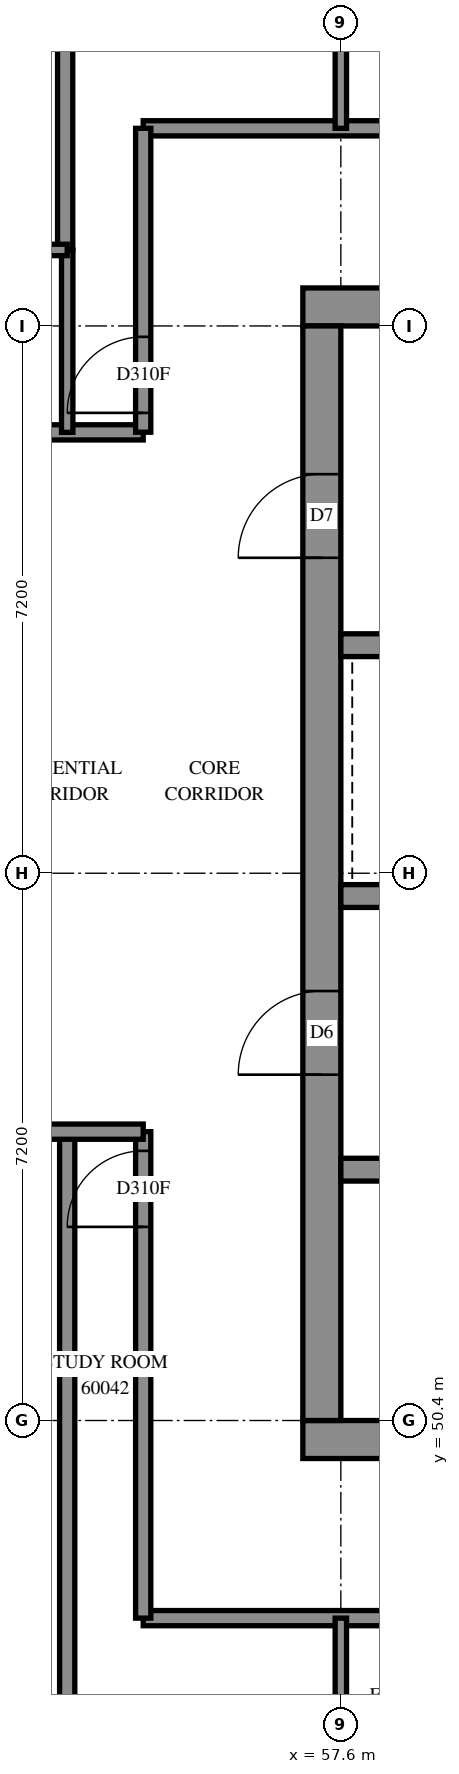
"""IFC4 building model, lengths in metres.
Left out: names, types, materials, properties, quantities, classifications, styles, units other than length and angle.
Written with IfcOpenShell. Run it as: python <this file> out.ifc"""

import sys

from ifc_helpers import new_model, si_unit, direction, frame, frame_2d, origin, place, context, subcontext, project, spatial, rectangle, extrude, element, fill, save


model = new_model("IFC4")
c1 = context("Model", 3, precision=1e-05, world=origin(), true_north=direction((0.0, 1.0)))
c2 = subcontext(c1, "Body", "Model", "MODEL_VIEW")
j1 = project(units=[si_unit("LENGTHUNIT", "METRE"), si_unit("PLANEANGLEUNIT", "RADIAN")], contexts=[c1])
p1 = place(None, origin())
s1 = spatial("IfcSite", under=j1, at=p1, CompositionType="ELEMENT")
p2 = place(p1, origin())
s2 = spatial("IfcBuilding", under=s1, at=p2, CompositionType="ELEMENT")
p3 = place(p2, frame((0.0, 0.0, 220.2)))
s3 = spatial("IfcBuildingStorey", under=s2, at=p3, CompositionType="ELEMENT", Elevation=220.2)
p4 = place(p3, frame((57.1, 50.15, -0.3), z_axis=(0.0, 0.0, 1.0), x_axis=(1.0, 0.0, 0.0)))
e1 = element("IfcWall", 1, at=p4, inside=s3, PredefinedType="SHEAR", context=c2, shape_type="SweptSolid", body=[
    extrude(rectangle(XDim=15.4, YDim=0.5, at=frame_2d((7.7, 0.0))), origin(), (0.0, 0.0, 1.0), 2.7),
])
p5 = place(p3, frame((57.1, 65.05, -0.3), z_axis=(0.0, 0.0, 1.0), x_axis=(1.0, 0.0, 0.0)))
e2 = element("IfcWall", 2, at=p5, inside=s3, PredefinedType="SHEAR", context=c2, shape_type="SweptSolid", body=[
    extrude(rectangle(XDim=15.4, YDim=0.5, at=frame_2d((7.7, 0.0))), origin(), (0.0, 0.0, 1.0), 2.7),
])
p6 = place(p5, frame((10.5, 0.0, 0.3)))
e3 = element("IfcOpeningElement", 3, at=p6, cuts=e2, PredefinedType="OPENING", context=c2, shape_type="SweptSolid", body=[
    extrude(rectangle(XDim=0.8, YDim=2.1, at=frame_2d((0.4, 1.05))), frame((0.0, 0.26, 0.0), z_axis=(0.0, -1.0, 0.0), x_axis=(1.0, 0.0, 0.0)), (0.0, 0.0, 1.0), 0.52),
])
p7 = place(p3, frame((57.35, 50.4, -0.3), z_axis=(0.0, 0.0, 1.0), x_axis=(0.0, 1.0, 0.0)))
e4 = element("IfcWall", 4, at=p7, inside=s3, PredefinedType="SHEAR", context=c2, shape_type="SweptSolid", body=[
    extrude(rectangle(XDim=14.4, YDim=0.5, at=frame_2d((7.2, 0.0))), origin(), (0.0, 0.0, 1.0), 2.7),
])
p8 = place(p7, frame((4.55, 0.0, 0.3)))
e5 = element("IfcOpeningElement", 5, at=p8, cuts=e4, PredefinedType="OPENING", context=c2, shape_type="SweptSolid", body=[
    extrude(rectangle(XDim=1.1, YDim=2.1, at=frame_2d((0.55, 1.05))), frame((0.0, 0.26, 0.0), z_axis=(0.0, -1.0, 0.0), x_axis=(1.0, 0.0, 0.0)), (0.0, 0.0, 1.0), 0.52),
])
p9 = place(p7, frame((11.35, 0.0, 0.3)))
e6 = element("IfcOpeningElement", 6, at=p9, cuts=e4, PredefinedType="OPENING", context=c2, shape_type="SweptSolid", body=[
    extrude(rectangle(XDim=1.1, YDim=2.1, at=frame_2d((0.55, 1.05))), frame((0.0, 0.26, 0.0), z_axis=(0.0, -1.0, 0.0), x_axis=(1.0, 0.0, 0.0)), (0.0, 0.0, 1.0), 0.52),
])
p10 = place(p3, frame((57.6, 53.7, 0.0), z_axis=(0.0, 0.0, 1.0), x_axis=(1.0, 0.0, 0.0)))
e7 = element("IfcWall", 7, at=p10, inside=s3, PredefinedType="SOLIDWALL", context=c2, shape_type="SweptSolid", body=[
    extrude(rectangle(XDim=14.4, YDim=0.3, at=frame_2d((7.2, 0.0))), origin(), (0.0, 0.0, 1.0), 3.1),
])
p11 = place(p10, frame((1.35, 0.0, 0.0)))
e8 = element("IfcOpeningElement", 8, at=p11, cuts=e7, PredefinedType="OPENING", context=c2, shape_type="SweptSolid", body=[
    extrude(rectangle(XDim=0.9, YDim=2.1, at=frame_2d((0.45, 1.05))), frame((0.0, 0.16, 0.0), z_axis=(0.0, -1.0, 0.0), x_axis=(1.0, 0.0, 0.0)), (0.0, 0.0, 1.0), 0.32),
])
p12 = place(p10, frame((4.95, 0.0, 0.0)))
e9 = element("IfcOpeningElement", 9, at=p12, cuts=e7, PredefinedType="OPENING", context=c2, shape_type="SweptSolid", body=[
    extrude(rectangle(XDim=0.9, YDim=2.1, at=frame_2d((0.45, 1.05))), frame((0.0, 0.16, 0.0), z_axis=(0.0, -1.0, 0.0), x_axis=(1.0, 0.0, 0.0)), (0.0, 0.0, 1.0), 0.32),
])
p13 = place(p10, frame((8.55, 0.0, 0.0)))
e10 = element("IfcOpeningElement", 10, at=p13, cuts=e7, PredefinedType="OPENING", context=c2, shape_type="SweptSolid", body=[
    extrude(rectangle(XDim=0.9, YDim=2.1, at=frame_2d((0.45, 1.05))), frame((0.0, 0.16, 0.0), z_axis=(0.0, -1.0, 0.0), x_axis=(1.0, 0.0, 0.0)), (0.0, 0.0, 1.0), 0.32),
])
p14 = place(p10, frame((12.05, 0.0, 0.0)))
e11 = element("IfcOpeningElement", 11, at=p14, cuts=e7, PredefinedType="OPENING", context=c2, shape_type="SweptSolid", body=[
    extrude(rectangle(XDim=1.1, YDim=2.1, at=frame_2d((0.55, 1.05))), frame((0.0, 0.16, 0.0), z_axis=(0.0, -1.0, 0.0), x_axis=(1.0, 0.0, 0.0)), (0.0, 0.0, 1.0), 0.32),
])
p15 = place(p3, frame((57.6, 57.3, 0.0), z_axis=(0.0, 0.0, 1.0), x_axis=(1.0, 0.0, 0.0)))
e12 = element("IfcWall", 12, at=p15, inside=s3, PredefinedType="SOLIDWALL", context=c2, shape_type="SweptSolid", body=[
    extrude(rectangle(XDim=14.4, YDim=0.3, at=frame_2d((7.2, 0.0))), origin(), (0.0, 0.0, 1.0), 3.1),
])
p16 = place(p15, frame((1.25, 0.0, 0.0)))
e13 = element("IfcOpeningElement", 13, at=p16, cuts=e12, PredefinedType="OPENING", context=c2, shape_type="SweptSolid", body=[
    extrude(rectangle(XDim=1.1, YDim=2.1, at=frame_2d((0.55, 1.05))), frame((0.0, 0.16, 0.0), z_axis=(0.0, -1.0, 0.0), x_axis=(1.0, 0.0, 0.0)), (0.0, 0.0, 1.0), 0.32),
])
p17 = place(p15, frame((4.85, 0.0, 0.0)))
e14 = element("IfcOpeningElement", 14, at=p17, cuts=e12, PredefinedType="OPENING", context=c2, shape_type="SweptSolid", body=[
    extrude(rectangle(XDim=1.1, YDim=2.1, at=frame_2d((0.55, 1.05))), frame((0.0, 0.16, 0.0), z_axis=(0.0, -1.0, 0.0), x_axis=(1.0, 0.0, 0.0)), (0.0, 0.0, 1.0), 0.32),
])
p18 = place(p15, frame((8.45, 0.0, 0.0)))
e15 = element("IfcOpeningElement", 15, at=p18, cuts=e12, PredefinedType="OPENING", context=c2, shape_type="SweptSolid", body=[
    extrude(rectangle(XDim=1.1, YDim=2.1, at=frame_2d((0.55, 1.05))), frame((0.0, 0.16, 0.0), z_axis=(0.0, -1.0, 0.0), x_axis=(1.0, 0.0, 0.0)), (0.0, 0.0, 1.0), 0.32),
])
p19 = place(p15, frame((12.05, 0.0, 0.0)))
e16 = element("IfcOpeningElement", 16, at=p19, cuts=e12, PredefinedType="OPENING", context=c2, shape_type="SweptSolid", body=[
    extrude(rectangle(XDim=1.1, YDim=2.1, at=frame_2d((0.55, 1.05))), frame((0.0, 0.16, 0.0), z_axis=(0.0, -1.0, 0.0), x_axis=(1.0, 0.0, 0.0)), (0.0, 0.0, 1.0), 0.32),
])
p20 = place(p3, frame((57.6, 60.6, 0.0), z_axis=(0.0, 0.0, 1.0), x_axis=(1.0, 0.0, 0.0)))
e17 = element("IfcWall", 17, at=p20, inside=s3, PredefinedType="SOLIDWALL", context=c2, shape_type="SweptSolid", body=[
    extrude(rectangle(XDim=7.2, YDim=0.3, at=frame_2d((3.6, 0.0))), origin(), (0.0, 0.0, 1.0), 3.1),
])
p21 = place(p3, frame((55.0, 67.4, 0.0), z_axis=(0.0, 0.0, 1.0), x_axis=(1.0, 0.0, 0.0)))
e18 = element("IfcWall", 18, at=p21, inside=s3, PredefinedType="PARTITIONING", context=c2, shape_type="SweptSolid", body=[
    extrude(rectangle(XDim=19.6, YDim=0.2, at=frame_2d((9.8, 0.0))), origin(), (0.0, 0.0, 1.0), 3.1),
])
p22 = place(p21, frame((4.9, 0.0, 0.0)))
e19 = element("IfcOpeningElement", 19, at=p22, cuts=e18, PredefinedType="OPENING", context=c2, shape_type="SweptSolid", body=[
    extrude(rectangle(XDim=0.9, YDim=2.1, at=frame_2d((0.45, 1.05))), frame((0.0, 0.11, 0.0), z_axis=(0.0, -1.0, 0.0), x_axis=(1.0, 0.0, 0.0)), (0.0, 0.0, 1.0), 0.22),
])
p23 = place(p21, frame((6.6, 0.0, 0.0)))
e20 = element("IfcOpeningElement", 20, at=p23, cuts=e18, PredefinedType="OPENING", context=c2, shape_type="SweptSolid", body=[
    extrude(rectangle(XDim=0.9, YDim=2.1, at=frame_2d((0.45, 1.05))), frame((0.0, 0.11, 0.0), z_axis=(0.0, -1.0, 0.0), x_axis=(1.0, 0.0, 0.0)), (0.0, 0.0, 1.0), 0.22),
])
p24 = place(p21, frame((14.001, 0.0, 0.0)))
e21 = element("IfcOpeningElement", 21, at=p24, cuts=e18, PredefinedType="OPENING", context=c2, shape_type="SweptSolid", body=[
    extrude(rectangle(XDim=0.9, YDim=2.1, at=frame_2d((0.45, 1.05))), frame((0.0, 0.11, 0.0), z_axis=(0.0, -1.0, 0.0), x_axis=(1.0, 0.0, 0.0)), (0.0, 0.0, 1.0), 0.22),
])
p25 = place(p3, frame((55.0, 47.8, 0.0), z_axis=(0.0, 0.0, 1.0), x_axis=(1.0, 0.0, 0.0)))
e22 = element("IfcWall", 22, at=p25, inside=s3, PredefinedType="PARTITIONING", context=c2, shape_type="SweptSolid", body=[
    extrude(rectangle(XDim=19.266, YDim=0.2, at=frame_2d((9.633, 0.0))), origin(), (0.0, 0.0, 1.0), 3.1),
])
p26 = place(p25, frame((4.9, 0.0, 0.0)))
e23 = element("IfcOpeningElement", 23, at=p26, cuts=e22, PredefinedType="OPENING", context=c2, shape_type="SweptSolid", body=[
    extrude(rectangle(XDim=0.9, YDim=2.1, at=frame_2d((0.45, 1.05))), frame((0.0, 0.11, 0.0), z_axis=(0.0, -1.0, 0.0), x_axis=(1.0, 0.0, 0.0)), (0.0, 0.0, 1.0), 0.22),
])
p27 = place(p25, frame((6.6, 0.0, 0.0)))
e24 = element("IfcOpeningElement", 24, at=p27, cuts=e22, PredefinedType="OPENING", context=c2, shape_type="SweptSolid", body=[
    extrude(rectangle(XDim=0.9, YDim=2.1, at=frame_2d((0.45, 1.05))), frame((0.0, 0.11, 0.0), z_axis=(0.0, -1.0, 0.0), x_axis=(1.0, 0.0, 0.0)), (0.0, 0.0, 1.0), 0.22),
])
p28 = place(p25, frame((13.661, 0.0, 0.0)))
e25 = element("IfcOpeningElement", 25, at=p28, cuts=e22, PredefinedType="OPENING", context=c2, shape_type="SweptSolid", body=[
    extrude(rectangle(XDim=0.9, YDim=2.1, at=frame_2d((0.45, 1.05))), frame((0.0, 0.11, 0.0), z_axis=(0.0, -1.0, 0.0), x_axis=(1.0, 0.0, 0.0)), (0.0, 0.0, 1.0), 0.22),
])
p29 = place(p3, frame((40.602, 63.4, 0.0), z_axis=(0.0, 0.0, 1.0), x_axis=(1.0, 0.0, 0.0)))
e26 = element("IfcWall", 26, at=p29, inside=s3, PredefinedType="PARTITIONING", context=c2, shape_type="SweptSolid", body=[
    extrude(rectangle(XDim=14.398, YDim=0.2, at=frame_2d((7.199, 0.0))), origin(), (0.0, 0.0, 1.0), 3.1),
])
p30 = place(p29, frame((2.998, 0.0, 0.0)))
e27 = element("IfcOpeningElement", 27, at=p30, cuts=e26, PredefinedType="OPENING", context=c2, shape_type="SweptSolid", body=[
    extrude(rectangle(XDim=0.9, YDim=2.1, at=frame_2d((0.45, 1.05))), frame((0.0, 0.11, 0.0), z_axis=(0.0, -1.0, 0.0), x_axis=(1.0, 0.0, 0.0)), (0.0, 0.0, 1.0), 0.22),
])
p31 = place(p29, frame((8.498, 0.0, 0.0)))
e28 = element("IfcOpeningElement", 28, at=p31, cuts=e26, PredefinedType="OPENING", context=c2, shape_type="SweptSolid", body=[
    extrude(rectangle(XDim=0.9, YDim=2.1, at=frame_2d((0.45, 1.05))), frame((0.0, 0.11, 0.0), z_axis=(0.0, -1.0, 0.0), x_axis=(1.0, 0.0, 0.0)), (0.0, 0.0, 1.0), 0.22),
])
p32 = place(p29, frame((10.198, 0.0, 0.0)))
e29 = element("IfcOpeningElement", 29, at=p32, cuts=e26, PredefinedType="OPENING", context=c2, shape_type="SweptSolid", body=[
    extrude(rectangle(XDim=0.9, YDim=2.1, at=frame_2d((0.45, 1.05))), frame((0.0, 0.11, 0.0), z_axis=(0.0, -1.0, 0.0), x_axis=(1.0, 0.0, 0.0)), (0.0, 0.0, 1.0), 0.22),
])
p33 = place(p3, frame((54.0, 42.319, 0.0), z_axis=(0.0, 0.0, 1.0), x_axis=(0.0, 1.0, 0.0)))
e30 = element("IfcWall", 30, at=p33, inside=s3, PredefinedType="PARTITIONING", context=c2, shape_type="SweptSolid", body=[
    extrude(rectangle(XDim=11.881, YDim=0.2, at=frame_2d((5.941, 0.0))), origin(), (0.0, 0.0, 1.0), 3.1),
])
p34 = place(p3, frame((53.973, 65.8, 0.0), z_axis=(0.0, 0.0, 1.0), x_axis=(0.0, 1.0, 0.0)))
e31 = element("IfcWall", 31, at=p34, inside=s3, PredefinedType="PARTITIONING", context=c2, shape_type="SweptSolid", body=[
    extrude(rectangle(XDim=6.994, YDim=0.2, at=frame_2d((3.497, 0.0))), origin(), (0.0, 0.0, 1.0), 3.1),
])
p35 = place(p3, frame((55.0, 47.8, 0.0), z_axis=(0.0, 0.0, 1.0), x_axis=(0.0, 1.0, 0.0)))
e32 = element("IfcWall", 32, at=p35, inside=s3, PredefinedType="PARTITIONING", context=c2, shape_type="SweptSolid", body=[
    extrude(rectangle(XDim=6.4, YDim=0.2, at=frame_2d((3.2, 0.0))), origin(), (0.0, 0.0, 1.0), 3.1),
])
p36 = place(p35, frame((5.147, 0.0, 0.0)))
e33 = element("IfcOpeningElement", 33, at=p36, cuts=e32, PredefinedType="OPENING", context=c2, shape_type="SweptSolid", body=[
    extrude(rectangle(XDim=1.0, YDim=2.1, at=frame_2d((0.5, 1.05))), frame((0.0, 0.11, 0.0), z_axis=(0.0, -1.0, 0.0), x_axis=(1.0, 0.0, 0.0)), (0.0, 0.0, 1.0), 0.22),
])
p37 = place(p3, frame((50.4, 54.2, 0.0), z_axis=(0.0, 0.0, 1.0), x_axis=(1.0, 0.0, 0.0)))
e34 = element("IfcWall", 34, at=p37, inside=s3, PredefinedType="PARTITIONING", context=c2, shape_type="SweptSolid", body=[
    extrude(rectangle(XDim=4.6, YDim=0.2, at=frame_2d((2.3, 0.0))), origin(), (0.0, 0.0, 1.0), 3.1),
])
p38 = place(p37, frame((2.3, 0.0, 0.0)))
e35 = element("IfcOpeningElement", 35, at=p38, cuts=e34, PredefinedType="OPENING", context=c2, shape_type="SweptSolid", body=[
    extrude(rectangle(XDim=0.9, YDim=2.1, at=frame_2d((0.45, 1.05))), frame((0.0, 0.11, 0.0), z_axis=(0.0, -1.0, 0.0), x_axis=(1.0, 0.0, 0.0)), (0.0, 0.0, 1.0), 0.22),
])
p39 = place(p3, frame((55.0, 63.402, 0.0), z_axis=(0.0, 0.0, 1.0), x_axis=(0.0, 1.0, 0.0)))
e36 = element("IfcWall", 36, at=p39, inside=s3, PredefinedType="PARTITIONING", context=c2, shape_type="SweptSolid", body=[
    extrude(rectangle(XDim=3.998, YDim=0.2, at=frame_2d((1.999, 0.0))), origin(), (0.0, 0.0, 1.0), 3.1),
])
p40 = place(p39, frame((0.255, 0.0, 0.0)))
e37 = element("IfcOpeningElement", 37, at=p40, cuts=e36, PredefinedType="OPENING", context=c2, shape_type="SweptSolid", body=[
    extrude(rectangle(XDim=1.0, YDim=2.1, at=frame_2d((0.5, 1.05))), frame((0.0, 0.11, 0.0), z_axis=(0.0, -1.0, 0.0), x_axis=(1.0, 0.0, 0.0)), (0.0, 0.0, 1.0), 0.22),
])
for number, where, z_axis, x_axis in (
    (38, (54.0, 63.4, 0.0), (0.0, 0.0, 1.0), (0.0, 1.0, 0.0)),
    (39, (57.6, 45.4, 0.0), (0.0, 0.0, 1.0), (0.0, 1.0, 0.0)),
    (40, (57.6, 67.4, 0.0), (0.0, 0.0, 1.0), (0.0, 1.0, 0.0)),
):
    element("IfcWall", number, at=place(p3, frame(where, z_axis=z_axis, x_axis=x_axis)), inside=s3, PredefinedType="PARTITIONING", context=c2, shape_type="SweptSolid", body=[
        extrude(rectangle(XDim=2.4, YDim=0.15, at=frame_2d((1.2, 0.0))), origin(), (0.0, 0.0, 1.0), 3.1),
    ])
p41 = place(p3, frame((52.1, 65.8, 0.0), z_axis=(0.0, 0.0, 1.0), x_axis=(1.0, 0.0, 0.0)))
e41 = element("IfcWall", 41, at=p41, inside=s3, PredefinedType="PARTITIONING", context=c2, shape_type="SweptSolid", body=[
    extrude(rectangle(XDim=1.9, YDim=0.15, at=frame_2d((0.95, 0.0))), origin(), (0.0, 0.0, 1.0), 3.1),
])
p42 = place(p41, frame((0.493, 0.0, 0.0)))
e42 = element("IfcOpeningElement", 42, at=p42, cuts=e41, PredefinedType="OPENING", context=c2, shape_type="SweptSolid", body=[
    extrude(rectangle(XDim=0.8, YDim=2.1, at=frame_2d((0.4, 1.05))), frame((0.0, 0.085, 0.0), z_axis=(0.0, -1.0, 0.0), x_axis=(1.0, 0.0, 0.0)), (0.0, 0.0, 1.0), 0.17),
])
p43 = place(p8, origin())
e43 = element("IfcDoor", 43, at=p43, inside=s3, OperationType="DOUBLE_DOOR_SINGLE_SWING", PredefinedType="DOOR", context=c2, shape_type="SweptSolid", body=[
    extrude(rectangle(XDim=1.1, YDim=2.1, at=frame_2d((0.55, 1.05))), frame((0.0, 0.025, 0.0), z_axis=(0.0, -1.0, 0.0), x_axis=(1.0, 0.0, 0.0)), (0.0, 0.0, 1.0), 0.05),
])
fill(e5, e43)
p44 = place(p9, origin())
e44 = element("IfcDoor", 44, at=p44, inside=s3, OperationType="SINGLE_SWING_LEFT", PredefinedType="DOOR", context=c2, shape_type="SweptSolid", body=[
    extrude(rectangle(XDim=1.1, YDim=2.1, at=frame_2d((0.55, 1.05))), frame((0.0, 0.025, 0.0), z_axis=(0.0, -1.0, 0.0), x_axis=(1.0, 0.0, 0.0)), (0.0, 0.0, 1.0), 0.05),
])
fill(e6, e44)
p45 = place(p40, origin())
e45 = element("IfcDoor", 45, at=p45, inside=s3, OperationType="SINGLE_SWING_LEFT", PredefinedType="DOOR", context=c2, shape_type="SweptSolid", body=[
    extrude(rectangle(XDim=1.0, YDim=2.1, at=frame_2d((0.5, 1.05))), frame((0.0, 0.025, 0.0), z_axis=(0.0, -1.0, 0.0), x_axis=(1.0, 0.0, 0.0)), (0.0, 0.0, 1.0), 0.05),
])
fill(e37, e45)
p46 = place(p36, origin())
e46 = element("IfcDoor", 46, at=p46, inside=s3, OperationType="SINGLE_SWING_RIGHT", PredefinedType="DOOR", context=c2, shape_type="SweptSolid", body=[
    extrude(rectangle(XDim=1.0, YDim=2.1, at=frame_2d((0.5, 1.05))), frame((0.0, 0.025, 0.0), z_axis=(0.0, -1.0, 0.0), x_axis=(1.0, 0.0, 0.0)), (0.0, 0.0, 1.0), 0.05),
])
fill(e33, e46)
save(model, sys.argv[1])
